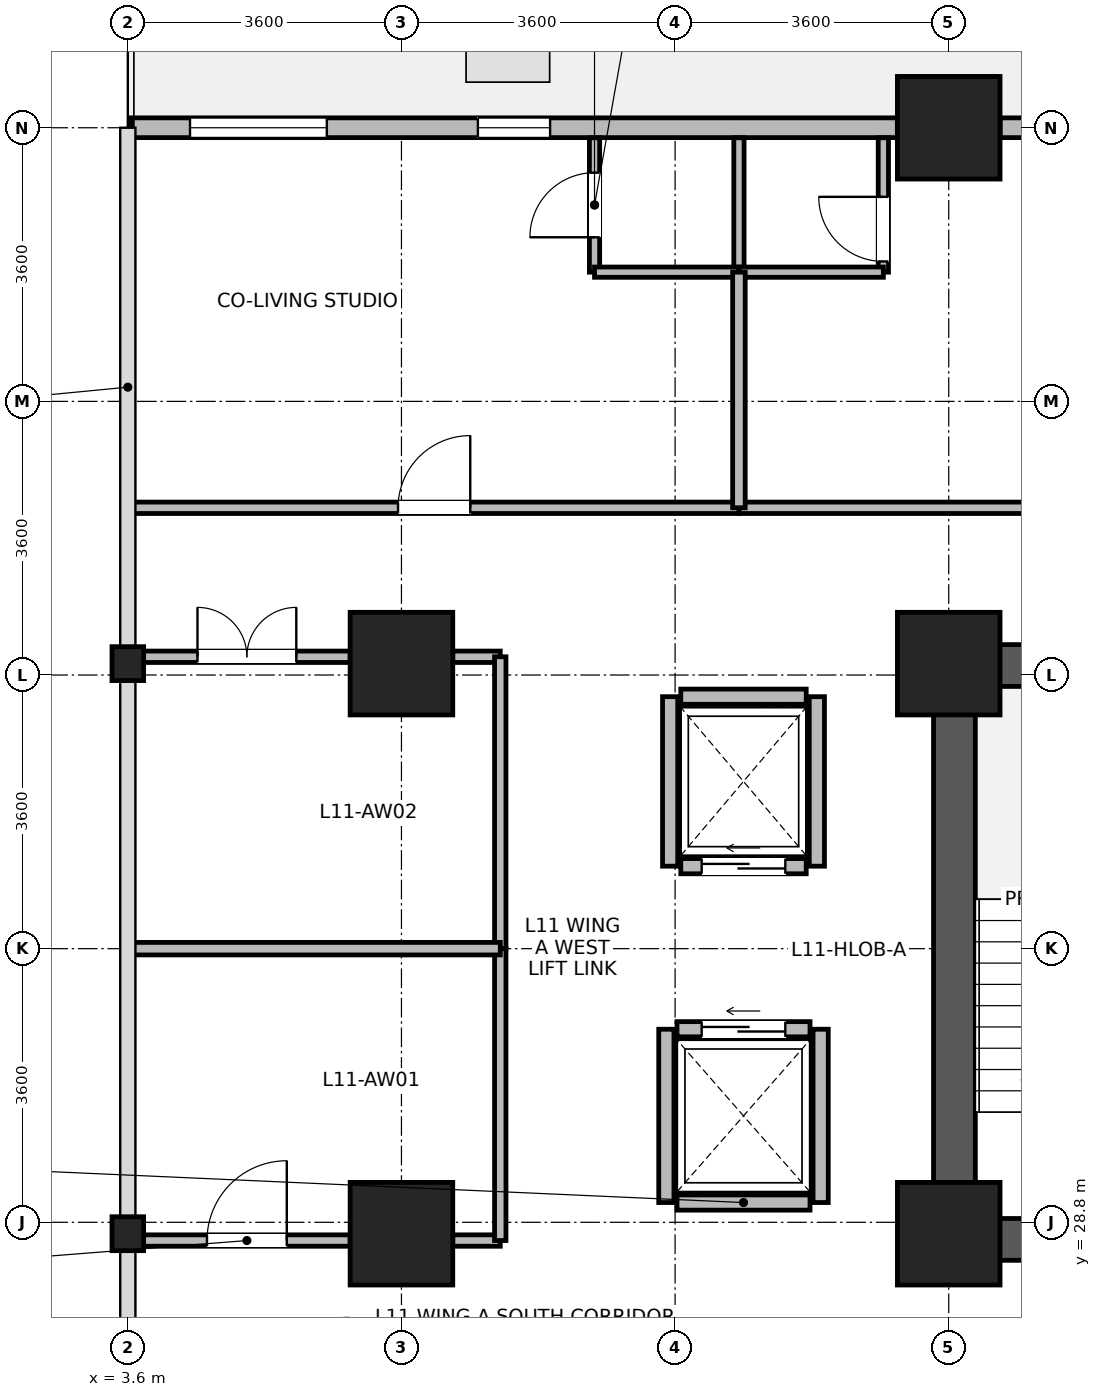
"""IFC4 building model, lengths in metres.
Left out: names, types, materials, properties, quantities, classifications, styles, units other than length and angle.
Written with IfcOpenShell. Run it as: python <this file> out.ifc"""

import sys

from ifc_helpers import new_model, si_unit, direction, frame, frame_2d, origin, origin_2d, place, context, subcontext, project, spatial, rectangle, i_section, extrude, source, transform, mapped, element, fill, save


model = new_model("IFC4")
c1 = context("Model", 3, precision=1e-05, world=origin(), true_north=direction((0.0, 1.0)))
c2 = subcontext(c1, "Body", "Model", "MODEL_VIEW")
j1 = project(units=[si_unit("LENGTHUNIT", "METRE"), si_unit("PLANEANGLEUNIT", "RADIAN")], contexts=[c1])
p1 = place(None, origin())
s1 = spatial("IfcSite", under=j1, at=p1, CompositionType="ELEMENT")
p2 = place(p1, origin())
s2 = spatial("IfcBuilding", under=s1, at=p2, CompositionType="ELEMENT")
p3 = place(p2, frame((0.0, 0.0, 47.5)))
s3 = spatial("IfcBuildingStorey", under=s2, at=p3, CompositionType="ELEMENT", Elevation=47.5)
p4 = place(p3, frame((14.475, 28.3, 0.0), z_axis=(0.0, 0.0, 1.0), x_axis=(0.0, 1.0, 0.0)))
e1 = element("IfcWall", 1, at=p4, inside=s3, PredefinedType="SHEAR", context=c2, shape_type="SweptSolid", body=[
    extrude(rectangle(XDim=8.1, YDim=0.55, at=frame_2d((4.05, 0.0))), origin(), (0.0, 0.0, 1.0), 3.45),
])
for number, where, z_axis, x_axis in (
    (2, (14.75, 28.575, 0.0), (0.0, 0.0, 1.0), (1.0, 0.0, 0.0)),
    (3, (14.75, 36.125, 0.0), (0.0, 0.0, 1.0), (1.0, 0.0, 0.0)),
):
    element("IfcWall", number, at=place(p3, frame(where, z_axis=z_axis, x_axis=x_axis)), inside=s3, PredefinedType="SHEAR", context=c2, shape_type="SweptSolid", body=[
        extrude(rectangle(XDim=3.2, YDim=0.55, at=frame_2d((1.6, 0.0))), origin(), (0.0, 0.0, 1.0), 3.45),
    ])
m1 = source(origin(), c2, "Body", "SweptSolid", [
    extrude(rectangle(XDim=1.35, YDim=1.35, at=origin_2d()), origin(), (0.0, 0.0, 1.0), 3.7),
])
for number, where, z_axis, x_axis in (
    (4, (7.2, 28.65, 0.0), (0.0, 0.0, 1.0), (1.0, 0.0, 0.0)),
    (5, (7.2, 36.15, 0.0), (0.0, 0.0, 1.0), (1.0, 0.0, 0.0)),
    (6, (14.4, 28.65, 0.0), (0.0, 0.0, 1.0), (1.0, 0.0, 0.0)),
    (7, (14.4, 36.15, 0.0), (0.0, 0.0, 1.0), (1.0, 0.0, 0.0)),
    (8, (14.4, 43.2, 0.0), (0.0, 0.0, 1.0), (1.0, 0.0, 0.0)),
):
    element("IfcColumn", number, at=place(p3, frame(where, z_axis=z_axis, x_axis=x_axis)), inside=s3, PredefinedType="COLUMN", context=c2, shape_type="MappedRepresentation", body=[
        mapped(m1, transform((0.0, 0.0, 0.0), x_axis=(1.0, 0.0, 0.0), y_axis=(0.0, 1.0, 0.0), z_axis=(0.0, 0.0, 1.0), scale=1.0)),
    ])
m2 = source(origin(), c2, "Body", "SweptSolid", [
    extrude(i_section(OverallWidth=0.416, OverallDepth=0.446, WebThickness=0.029, FlangeThickness=0.04, FilletRadius=0.015, at=origin_2d()), origin(), (0.0, 0.0, 1.0), 3.7),
])
for number, where, z_axis, x_axis in (
    (9, (3.6, 28.65, 0.0), (0.0, 0.0, 1.0), (1.0, 0.0, 0.0)),
    (10, (3.6, 36.15, 0.0), (0.0, 0.0, 1.0), (1.0, 0.0, 0.0)),
):
    element("IfcColumn", number, at=place(p3, frame(where, z_axis=z_axis, x_axis=x_axis)), inside=s3, PredefinedType="COLUMN", context=c2, shape_type="MappedRepresentation", body=[
        mapped(m2, transform((0.0, 0.0, 0.0), x_axis=(1.0, 0.0, 0.0), y_axis=(0.0, 1.0, 0.0), z_axis=(0.0, 0.0, 1.0), scale=1.0)),
    ])
p5 = place(p3, frame((15.076, 43.2, 0.0), z_axis=(0.0, 0.0, 1.0), x_axis=(1.0, 0.0, 0.0)))
e11 = element("IfcWall", 11, at=p5, inside=s3, PredefinedType="STANDARD", context=c2, shape_type="SweptSolid", body=[
    extrude(rectangle(XDim=2.715, YDim=0.26, at=frame_2d((1.357, 0.0))), origin(), (0.0, 0.0, 1.0), 2.93),
])
p6 = place(p5, frame((0.883, 0.0, 0.85)))
e12 = element("IfcOpeningElement", 12, at=p6, cuts=e11, PredefinedType="OPENING", context=c2, shape_type="SweptSolid", body=[
    extrude(rectangle(XDim=0.95, YDim=1.75, at=frame_2d((0.475, 0.875))), frame((0.0, 0.14, 0.0), z_axis=(0.0, -1.0, 0.0), x_axis=(1.0, 0.0, 0.0)), (0.0, 0.0, 1.0), 0.28),
])
p7 = place(p3, frame((3.637, 43.2, 0.0), z_axis=(0.0, 0.0, 1.0), x_axis=(1.0, 0.0, 0.0)))
e13 = element("IfcWall", 13, at=p7, inside=s3, PredefinedType="STANDARD", context=c2, shape_type="SweptSolid", body=[
    extrude(rectangle(XDim=10.087, YDim=0.26, at=frame_2d((5.043, 0.0))), origin(), (0.0, 0.0, 1.0), 3.43),
])
p8 = place(p7, frame((0.781, 0.0, 0.85)))
e14 = element("IfcOpeningElement", 14, at=p8, cuts=e13, PredefinedType="OPENING", context=c2, shape_type="SweptSolid", body=[
    extrude(rectangle(XDim=1.8, YDim=1.85, at=frame_2d((0.9, 0.925))), frame((0.0, 0.14, 0.0), z_axis=(0.0, -1.0, 0.0), x_axis=(1.0, 0.0, 0.0)), (0.0, 0.0, 1.0), 0.28),
])
p9 = place(p7, frame((4.569, 0.0, 0.85)))
e15 = element("IfcOpeningElement", 15, at=p9, cuts=e13, PredefinedType="OPENING", context=c2, shape_type="SweptSolid", body=[
    extrude(rectangle(XDim=0.95, YDim=1.75, at=frame_2d((0.475, 0.875))), frame((0.0, 0.14, 0.0), z_axis=(0.0, -1.0, 0.0), x_axis=(1.0, 0.0, 0.0)), (0.0, 0.0, 1.0), 0.28),
])
p10 = place(p3, frame((10.825, 29.06, 0.0), z_axis=(0.0, 0.0, 1.0), x_axis=(1.0, 0.0, 0.0)))
e16 = element("IfcWall", 16, at=p10, inside=s3, PredefinedType="PARTITIONING", context=c2, shape_type="SweptSolid", body=[
    extrude(rectangle(XDim=1.75, YDim=0.2, at=frame_2d((0.875, 0.0))), origin(), (0.0, 0.0, 1.0), 3.43),
])
p11 = place(p3, frame((10.825, 31.34, 0.0), z_axis=(0.0, 0.0, 1.0), x_axis=(1.0, 0.0, 0.0)))
e17 = element("IfcWall", 17, at=p11, inside=s3, PredefinedType="PARTITIONING", context=c2, shape_type="SweptSolid", body=[
    extrude(rectangle(XDim=1.75, YDim=0.2, at=frame_2d((0.875, 0.0))), origin(), (0.0, 0.0, 1.0), 3.43),
])
p12 = place(p11, frame((0.325, 0.0, 0.0)))
e18 = element("IfcOpeningElement", 18, at=p12, cuts=e17, PredefinedType="OPENING", context=c2, shape_type="SweptSolid", body=[
    extrude(rectangle(XDim=1.1, YDim=2.12, at=frame_2d((0.55, 1.06))), frame((0.0, 0.11, 0.0), z_axis=(0.0, -1.0, 0.0), x_axis=(1.0, 0.0, 0.0)), (0.0, 0.0, 1.0), 0.22),
])
for number, where, z_axis, x_axis in (
    (19, (10.685, 29.06, 0.0), (0.0, 0.0, 1.0), (0.0, 1.0, 0.0)),
    (20, (12.715, 29.06, 0.0), (0.0, 0.0, 1.0), (0.0, 1.0, 0.0)),
):
    element("IfcWall", number, at=place(p3, frame(where, z_axis=z_axis, x_axis=x_axis)), inside=s3, PredefinedType="PARTITIONING", context=c2, shape_type="SweptSolid", body=[
        extrude(rectangle(XDim=2.28, YDim=0.2, at=frame_2d((1.14, 0.0))), origin(), (0.0, 0.0, 1.0), 3.43),
    ])
p13 = place(p3, frame((10.875, 33.485, 0.0), z_axis=(0.0, 0.0, 1.0), x_axis=(1.0, 0.0, 0.0)))
e21 = element("IfcWall", 21, at=p13, inside=s3, PredefinedType="PARTITIONING", context=c2, shape_type="SweptSolid", body=[
    extrude(rectangle(XDim=1.65, YDim=0.2, at=frame_2d((0.825, 0.0))), origin(), (0.0, 0.0, 1.0), 3.43),
])
p14 = place(p13, frame((0.275, 0.0, 0.0)))
e22 = element("IfcOpeningElement", 22, at=p14, cuts=e21, PredefinedType="OPENING", context=c2, shape_type="SweptSolid", body=[
    extrude(rectangle(XDim=1.1, YDim=2.12, at=frame_2d((0.55, 1.06))), frame((0.0, 0.11, 0.0), z_axis=(0.0, -1.0, 0.0), x_axis=(1.0, 0.0, 0.0)), (0.0, 0.0, 1.0), 0.22),
])
p15 = place(p3, frame((10.875, 35.715, 0.0), z_axis=(0.0, 0.0, 1.0), x_axis=(1.0, 0.0, 0.0)))
e23 = element("IfcWall", 23, at=p15, inside=s3, PredefinedType="PARTITIONING", context=c2, shape_type="SweptSolid", body=[
    extrude(rectangle(XDim=1.65, YDim=0.2, at=frame_2d((0.825, 0.0))), origin(), (0.0, 0.0, 1.0), 3.43),
])
for number, where, z_axis, x_axis in (
    (24, (10.735, 33.485, 0.0), (0.0, 0.0, 1.0), (0.0, 1.0, 0.0)),
    (25, (12.665, 33.485, 0.0), (0.0, 0.0, 1.0), (0.0, 1.0, 0.0)),
):
    element("IfcWall", number, at=place(p3, frame(where, z_axis=z_axis, x_axis=x_axis)), inside=s3, PredefinedType="PARTITIONING", context=c2, shape_type="SweptSolid", body=[
        extrude(rectangle(XDim=2.23, YDim=0.2, at=frame_2d((1.115, 0.0))), origin(), (0.0, 0.0, 1.0), 3.43),
    ])
p16 = place(p3, frame((9.74, 41.3, 0.0), z_axis=(0.0, 0.0, 1.0), x_axis=(0.0, 1.0, 0.0)))
e26 = element("IfcWall", 26, at=p16, inside=s3, PredefinedType="PARTITIONING", context=c2, shape_type="SweptSolid", body=[
    extrude(rectangle(XDim=1.768, YDim=0.135, at=frame_2d((0.884, 0.0))), origin(), (0.0, 0.0, 1.0), 3.43),
])
p17 = place(p16, frame((0.459, 0.0, 0.0)))
e27 = element("IfcOpeningElement", 27, at=p17, cuts=e26, PredefinedType="OPENING", context=c2, shape_type="SweptSolid", body=[
    extrude(rectangle(XDim=0.85, YDim=2.04, at=frame_2d((0.425, 1.02))), frame((0.0, 0.078, 0.0), z_axis=(0.0, -1.0, 0.0), x_axis=(1.0, 0.0, 0.0)), (0.0, 0.0, 1.0), 0.155),
])
p18 = place(p3, frame((11.64, 41.3, 0.0), z_axis=(0.0, 0.0, 1.0), x_axis=(0.0, 1.0, 0.0)))
e28 = element("IfcWall", 28, at=p18, inside=s3, PredefinedType="PARTITIONING", context=c2, shape_type="SweptSolid", body=[
    extrude(rectangle(XDim=1.768, YDim=0.135, at=frame_2d((0.884, 0.0))), origin(), (0.0, 0.0, 1.0), 3.43),
])
p19 = place(p3, frame((13.54, 41.3, 0.0), z_axis=(0.0, 0.0, 1.0), x_axis=(0.0, 1.0, 0.0)))
e29 = element("IfcWall", 29, at=p19, inside=s3, PredefinedType="PARTITIONING", context=c2, shape_type="SweptSolid", body=[
    extrude(rectangle(XDim=1.768, YDim=0.135, at=frame_2d((0.884, 0.0))), origin(), (0.0, 0.0, 1.0), 3.43),
])
p20 = place(p19, frame((0.141, 0.0, 0.0)))
e30 = element("IfcOpeningElement", 30, at=p20, cuts=e29, PredefinedType="OPENING", context=c2, shape_type="SweptSolid", body=[
    extrude(rectangle(XDim=0.85, YDim=2.04, at=frame_2d((0.425, 1.02))), frame((0.0, 0.078, 0.0), z_axis=(0.0, -1.0, 0.0), x_axis=(1.0, 0.0, 0.0)), (0.0, 0.0, 1.0), 0.155),
])
p21 = place(p3, frame((9.74, 41.3, 0.0), z_axis=(0.0, 0.0, 1.0), x_axis=(1.0, 0.0, 0.0)))
e31 = element("IfcWall", 31, at=p21, inside=s3, PredefinedType="PARTITIONING", context=c2, shape_type="SweptSolid", body=[
    extrude(rectangle(XDim=1.9, YDim=0.135, at=frame_2d((0.95, 0.0))), origin(), (0.0, 0.0, 1.0), 3.43),
])
p22 = place(p3, frame((11.64, 41.3, 0.0), z_axis=(0.0, 0.0, 1.0), x_axis=(1.0, 0.0, 0.0)))
e32 = element("IfcWall", 32, at=p22, inside=s3, PredefinedType="PARTITIONING", context=c2, shape_type="SweptSolid", body=[
    extrude(rectangle(XDim=1.9, YDim=0.135, at=frame_2d((0.95, 0.0))), origin(), (0.0, 0.0, 1.0), 3.43),
])
p23 = place(p3, frame((11.64, 38.2, 0.0), z_axis=(0.0, 0.0, 1.0), x_axis=(1.0, 0.0, 0.0)))
e33 = element("IfcWall", 33, at=p23, inside=s3, PredefinedType="PARTITIONING", context=c2, shape_type="SweptSolid", body=[
    extrude(rectangle(XDim=8.44, YDim=0.15, at=frame_2d((4.22, 0.0))), origin(), (0.0, 0.0, 1.0), 3.43),
])
p24 = place(p23, frame((3.745, 0.0, 0.0)))
e34 = element("IfcOpeningElement", 34, at=p24, cuts=e33, PredefinedType="OPENING", context=c2, shape_type="SweptSolid", body=[
    extrude(rectangle(XDim=0.95, YDim=2.1, at=frame_2d((0.475, 1.05))), frame((0.0, 0.085, 0.0), z_axis=(0.0, -1.0, 0.0), x_axis=(1.0, 0.0, 0.0)), (0.0, 0.0, 1.0), 0.17),
])
p25 = place(p3, frame((3.62, 38.2, 0.0), z_axis=(0.0, 0.0, 1.0), x_axis=(1.0, 0.0, 0.0)))
e35 = element("IfcWall", 35, at=p25, inside=s3, PredefinedType="PARTITIONING", context=c2, shape_type="SweptSolid", body=[
    extrude(rectangle(XDim=8.02, YDim=0.15, at=frame_2d((4.01, 0.0))), origin(), (0.0, 0.0, 1.0), 3.43),
])
p26 = place(p25, frame((3.535, 0.0, 0.0)))
e36 = element("IfcOpeningElement", 36, at=p26, cuts=e35, PredefinedType="OPENING", context=c2, shape_type="SweptSolid", body=[
    extrude(rectangle(XDim=0.95, YDim=2.1, at=frame_2d((0.475, 1.05))), frame((0.0, 0.085, 0.0), z_axis=(0.0, -1.0, 0.0), x_axis=(1.0, 0.0, 0.0)), (0.0, 0.0, 1.0), 0.17),
])
p27 = place(p3, frame((3.808, 28.56, 0.0), z_axis=(0.0, 0.0, 1.0), x_axis=(1.0, 0.0, 0.0)))
e37 = element("IfcWall", 37, at=p27, inside=s3, PredefinedType="PARTITIONING", context=c2, shape_type="SweptSolid", body=[
    extrude(rectangle(XDim=2.717, YDim=0.15, at=frame_2d((1.358, 0.0))), origin(), (0.0, 0.0, 1.0), 2.78),
])
p28 = place(p27, frame((0.833, 0.0, 0.0)))
e38 = element("IfcOpeningElement", 38, at=p28, cuts=e37, PredefinedType="OPENING", context=c2, shape_type="SweptSolid", body=[
    extrude(rectangle(XDim=1.05, YDim=2.12, at=frame_2d((0.525, 1.06))), frame((0.0, 0.085, 0.0), z_axis=(0.0, -1.0, 0.0), x_axis=(1.0, 0.0, 0.0)), (0.0, 0.0, 1.0), 0.17),
])
p29 = place(p3, frame((7.875, 28.56, 0.0), z_axis=(0.0, 0.0, 1.0), x_axis=(1.0, 0.0, 0.0)))
e39 = element("IfcWall", 39, at=p29, inside=s3, PredefinedType="PARTITIONING", context=c2, shape_type="SweptSolid", body=[
    extrude(rectangle(XDim=0.625, YDim=0.15, at=frame_2d((0.312, 0.0))), origin(), (0.0, 0.0, 1.0), 2.78),
])
p30 = place(p3, frame((3.808, 36.24, 0.0), z_axis=(0.0, 0.0, 1.0), x_axis=(1.0, 0.0, 0.0)))
e40 = element("IfcWall", 40, at=p30, inside=s3, PredefinedType="PARTITIONING", context=c2, shape_type="SweptSolid", body=[
    extrude(rectangle(XDim=2.717, YDim=0.15, at=frame_2d((1.358, 0.0))), origin(), (0.0, 0.0, 1.0), 2.78),
])
p31 = place(p30, frame((0.708, 0.0, 0.0)))
e41 = element("IfcOpeningElement", 41, at=p31, cuts=e40, PredefinedType="OPENING", context=c2, shape_type="SweptSolid", body=[
    extrude(rectangle(XDim=1.3, YDim=2.12, at=frame_2d((0.65, 1.06))), frame((0.0, 0.085, 0.0), z_axis=(0.0, -1.0, 0.0), x_axis=(1.0, 0.0, 0.0)), (0.0, 0.0, 1.0), 0.17),
])
p32 = place(p3, frame((7.875, 36.24, 0.0), z_axis=(0.0, 0.0, 1.0), x_axis=(1.0, 0.0, 0.0)))
e42 = element("IfcWall", 42, at=p32, inside=s3, PredefinedType="PARTITIONING", context=c2, shape_type="SweptSolid", body=[
    extrude(rectangle(XDim=0.625, YDim=0.15, at=frame_2d((0.312, 0.0))), origin(), (0.0, 0.0, 1.0), 2.78),
])
p33 = place(p3, frame((8.5, 32.4, 0.0), z_axis=(0.0, 0.0, 1.0), x_axis=(0.0, 1.0, 0.0)))
e43 = element("IfcWall", 43, at=p33, inside=s3, PredefinedType="PARTITIONING", context=c2, shape_type="SweptSolid", body=[
    extrude(rectangle(XDim=3.84, YDim=0.15, at=frame_2d((1.92, 0.0))), origin(), (0.0, 0.0, 1.0), 3.43),
])
p34 = place(p3, frame((8.5, 28.56, 0.0), z_axis=(0.0, 0.0, 1.0), x_axis=(0.0, 1.0, 0.0)))
e44 = element("IfcWall", 44, at=p34, inside=s3, PredefinedType="PARTITIONING", context=c2, shape_type="SweptSolid", body=[
    extrude(rectangle(XDim=3.84, YDim=0.15, at=frame_2d((1.92, 0.0))), origin(), (0.0, 0.0, 1.0), 3.43),
])
p35 = place(p3, frame((3.62, 32.4, 0.0), z_axis=(0.0, 0.0, 1.0), x_axis=(1.0, 0.0, 0.0)))
e45 = element("IfcWall", 45, at=p35, inside=s3, PredefinedType="PARTITIONING", context=c2, shape_type="SweptSolid", body=[
    extrude(rectangle(XDim=4.88, YDim=0.165, at=frame_2d((2.44, 0.0))), origin(), (0.0, 0.0, 1.0), 3.43),
])
p36 = place(p3, frame((11.64, 38.2, 0.0), z_axis=(0.0, 0.0, 1.0), x_axis=(0.0, 1.0, 0.0)))
e46 = element("IfcWall", 46, at=p36, inside=s3, PredefinedType="PARTITIONING", context=c2, shape_type="SweptSolid", body=[
    extrude(rectangle(XDim=3.1, YDim=0.165, at=frame_2d((1.55, 0.0))), origin(), (0.0, 0.0, 1.0), 3.43),
])
p37 = place(p8, origin())
e47 = element("IfcWindow", 47, at=p37, inside=s3, PartitioningType="SINGLE_PANEL", PredefinedType="WINDOW", context=c2, shape_type="SweptSolid", body=[
    extrude(rectangle(XDim=1.8, YDim=1.85, at=frame_2d((0.9, 0.925))), frame((0.0, 0.03, 0.0), z_axis=(0.0, -1.0, 0.0), x_axis=(1.0, 0.0, 0.0)), (0.0, 0.0, 1.0), 0.06),
])
fill(e14, e47)
p38 = place(p9, origin())
e48 = element("IfcWindow", 48, at=p38, inside=s3, PartitioningType="SINGLE_PANEL", PredefinedType="WINDOW", context=c2, shape_type="SweptSolid", body=[
    extrude(rectangle(XDim=0.95, YDim=1.75, at=frame_2d((0.475, 0.875))), frame((0.0, 0.03, 0.0), z_axis=(0.0, -1.0, 0.0), x_axis=(1.0, 0.0, 0.0)), (0.0, 0.0, 1.0), 0.06),
])
fill(e15, e48)
p39 = place(p12, origin())
e49 = element("IfcDoor", 49, at=p39, inside=s3, OperationType="SLIDING_TO_LEFT", PredefinedType="DOOR", context=c2, shape_type="SweptSolid", body=[
    extrude(rectangle(XDim=1.1, YDim=2.12, at=frame_2d((0.55, 1.06))), frame((0.0, 0.025, 0.0), z_axis=(0.0, -1.0, 0.0), x_axis=(1.0, 0.0, 0.0)), (0.0, 0.0, 1.0), 0.05),
])
fill(e18, e49)
p40 = place(p14, origin())
e50 = element("IfcDoor", 50, at=p40, inside=s3, OperationType="SLIDING_TO_LEFT", PredefinedType="DOOR", context=c2, shape_type="SweptSolid", body=[
    extrude(rectangle(XDim=1.1, YDim=2.12, at=frame_2d((0.55, 1.06))), frame((0.0, 0.025, 0.0), z_axis=(0.0, -1.0, 0.0), x_axis=(1.0, 0.0, 0.0)), (0.0, 0.0, 1.0), 0.05),
])
fill(e22, e50)
p41 = place(p17, origin())
e51 = element("IfcDoor", 51, at=p41, inside=s3, OperationType="SINGLE_SWING_LEFT", PredefinedType="DOOR", context=c2, shape_type="SweptSolid", body=[
    extrude(rectangle(XDim=0.85, YDim=2.04, at=frame_2d((0.425, 1.02))), frame((0.0, 0.025, 0.0), z_axis=(0.0, -1.0, 0.0), x_axis=(1.0, 0.0, 0.0)), (0.0, 0.0, 1.0), 0.05),
])
fill(e27, e51)
p42 = place(p20, origin())
e52 = element("IfcDoor", 52, at=p42, inside=s3, OperationType="SINGLE_SWING_RIGHT", PredefinedType="DOOR", context=c2, shape_type="SweptSolid", body=[
    extrude(rectangle(XDim=0.85, YDim=2.04, at=frame_2d((0.425, 1.02))), frame((0.0, 0.025, 0.0), z_axis=(0.0, -1.0, 0.0), x_axis=(1.0, 0.0, 0.0)), (0.0, 0.0, 1.0), 0.05),
])
fill(e30, e52)
p43 = place(p26, origin())
e53 = element("IfcDoor", 53, at=p43, inside=s3, OperationType="SINGLE_SWING_RIGHT", PredefinedType="DOOR", context=c2, shape_type="SweptSolid", body=[
    extrude(rectangle(XDim=0.95, YDim=2.1, at=frame_2d((0.475, 1.05))), frame((0.0, 0.025, 0.0), z_axis=(0.0, -1.0, 0.0), x_axis=(1.0, 0.0, 0.0)), (0.0, 0.0, 1.0), 0.05),
])
fill(e36, e53)
p44 = place(p28, origin())
e54 = element("IfcDoor", 54, at=p44, inside=s3, OperationType="SINGLE_SWING_RIGHT", PredefinedType="DOOR", context=c2, shape_type="SweptSolid", body=[
    extrude(rectangle(XDim=1.05, YDim=2.12, at=frame_2d((0.525, 1.06))), frame((0.0, 0.025, 0.0), z_axis=(0.0, -1.0, 0.0), x_axis=(1.0, 0.0, 0.0)), (0.0, 0.0, 1.0), 0.05),
])
fill(e38, e54)
p45 = place(p31, origin())
e55 = element("IfcDoor", 55, at=p45, inside=s3, OperationType="DOUBLE_DOOR_SINGLE_SWING", PredefinedType="DOOR", context=c2, shape_type="SweptSolid", body=[
    extrude(rectangle(XDim=1.3, YDim=2.12, at=frame_2d((0.65, 1.06))), frame((0.0, 0.025, 0.0), z_axis=(0.0, -1.0, 0.0), x_axis=(1.0, 0.0, 0.0)), (0.0, 0.0, 1.0), 0.05),
])
fill(e41, e55)
save(model, sys.argv[1])
